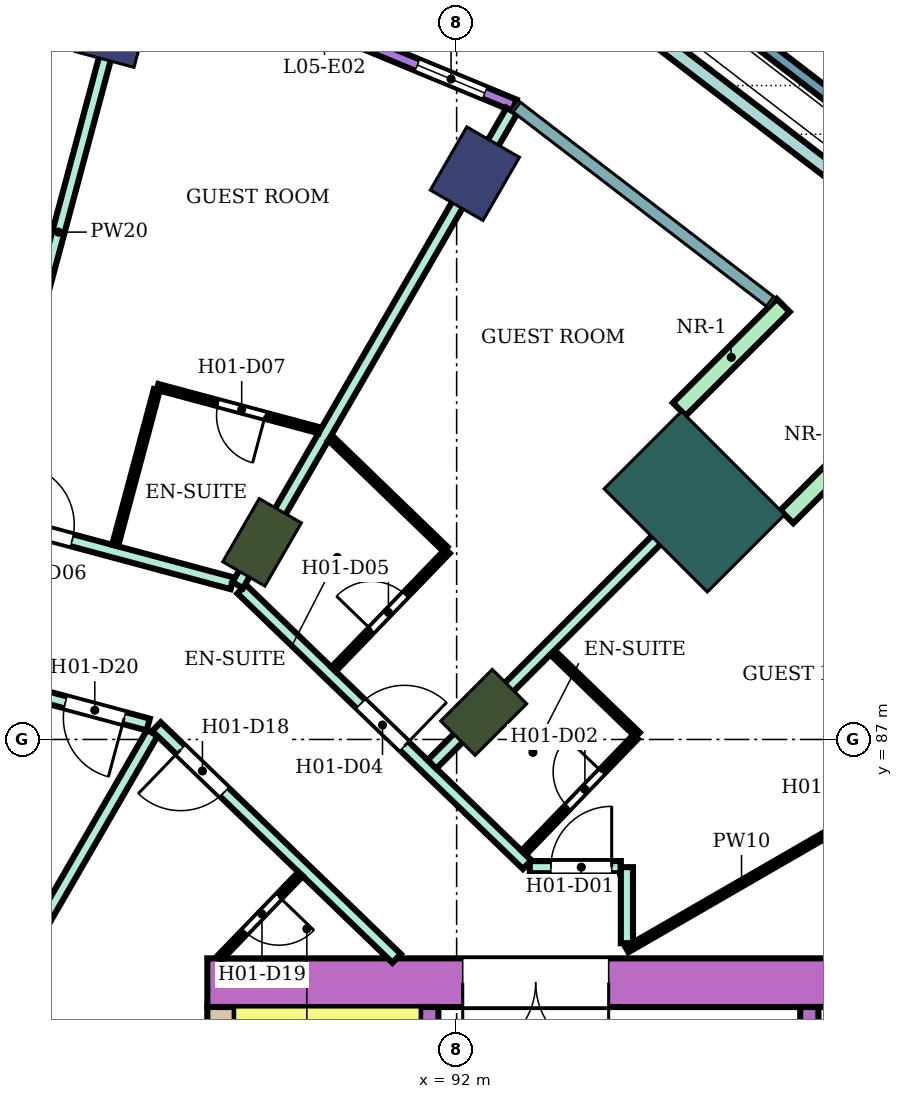
"""IFC4 building model, lengths in metres.
Left out: names, types, materials, properties, quantities, classifications, styles, units other than length and angle.
Written with IfcOpenShell. Run it as: python <this file> out.ifc"""

import sys

from ifc_helpers import new_model, si_unit, direction, frame, frame_2d, origin, origin_2d, place, context, subcontext, project, spatial, rectangle, extrude, element, fill, save


model = new_model("IFC4")
c1 = context("Model", 3, precision=1e-05, world=origin(), true_north=direction((0.0, 1.0)))
c2 = subcontext(c1, "Body", "Model", "MODEL_VIEW")
j1 = project(units=[si_unit("LENGTHUNIT", "METRE"), si_unit("PLANEANGLEUNIT", "RADIAN")], contexts=[c1])
p1 = place(None, origin())
s1 = spatial("IfcSite", under=j1, at=p1, CompositionType="ELEMENT")
p2 = place(p1, origin())
s2 = spatial("IfcBuilding", under=s1, at=p2, CompositionType="ELEMENT")
p3 = place(p2, frame((0.0, 0.0, 28.8)))
s3 = spatial("IfcBuildingStorey", under=s2, at=p3, CompositionType="ELEMENT", Elevation=28.8)
for number, where, z_axis, x_axis in (
    (1, (92.3, 96.304, 0.0), (0.0, 0.0, 1.0), (0.5, 0.866, 0.0)),
    (2, (86.367, 98.762, 0.0), (0.0, 0.0, 1.0), (0.259, 0.966, 0.0)),
):
    element("IfcColumn", number, at=place(p3, frame(where, z_axis=z_axis, x_axis=x_axis)), inside=s3, PredefinedType="COLUMN", context=c2, shape_type="SweptSolid", body=[
        extrude(rectangle(XDim=1.2, YDim=1.0, at=origin_2d()), origin(), (0.0, 0.0, 1.0), 3.8),
    ])
for number, where, z_axis, x_axis in (
    (3, (92.445, 87.445, 0.0), (0.0, 0.0, 1.0), (0.707, 0.707, 0.0)),
    (4, (88.8, 90.242, 0.0), (0.0, 0.0, 1.0), (0.5, 0.866, 0.0)),
):
    element("IfcColumn", number, at=place(p3, frame(where, z_axis=z_axis, x_axis=x_axis)), inside=s3, PredefinedType="COLUMN", context=c2, shape_type="SweptSolid", body=[
        extrude(rectangle(XDim=1.2, YDim=0.8, at=origin_2d()), origin(), (0.0, 0.0, 1.0), 3.8),
    ])
p4 = place(p3, frame((95.91, 90.91, 0.0), z_axis=(0.0, 0.0, 1.0), x_axis=(0.707106781187, 0.707106781187, 0.0)))
e5 = element("IfcColumn", 5, at=p4, inside=s3, PredefinedType="COLUMN", context=c2, shape_type="SweptSolid", body=[
    extrude(rectangle(XDim=1.8, YDim=2.4, at=origin_2d()), origin(), (0.0, 0.0, 1.0), 3.8),
])
p5 = place(p3, frame((87.9, 83.0, 0.0), z_axis=(0.0, 0.0, 1.0), x_axis=(1.0, 0.0, 0.0)))
e6 = element("IfcWall", 6, at=p5, inside=s3, PredefinedType="SHEAR", context=c2, shape_type="SweptSolid", body=[
    extrude(rectangle(XDim=14.7, YDim=0.8, at=frame_2d((7.35, 0.0))), origin(), (0.0, 0.0, 1.0), 3.48),
])
p6 = place(p5, frame((4.2, 0.0, 0.0)))
e7 = element("IfcOpeningElement", 7, at=p6, cuts=e6, PredefinedType="OPENING", context=c2, shape_type="SweptSolid", body=[
    extrude(rectangle(XDim=2.4, YDim=2.4, at=frame_2d((1.2, 1.2))), frame((0.0, 0.41, 0.0), z_axis=(0.0, -1.0, 0.0), x_axis=(1.0, 0.0, 0.0)), (0.0, 0.0, 1.0), 0.82),
])
p7 = place(p3, frame((88.125, 75.0, 0.0), z_axis=(0.0, 0.0, 1.0), x_axis=(0.0, 1.0, 0.0)))
e8 = element("IfcWall", 8, at=p7, inside=s3, PredefinedType="SHEAR", context=c2, shape_type="SweptSolid", body=[
    extrude(rectangle(XDim=7.6, YDim=0.45, at=frame_2d((3.8, 0.0))), origin(), (0.0, 0.0, 1.0), 3.48),
])
p8 = place(p3, frame((91.55, 75.0, 0.0), z_axis=(0.0, 0.0, 1.0), x_axis=(0.0, 1.0, 0.0)))
e9 = element("IfcWall", 9, at=p8, inside=s3, PredefinedType="SHEAR", context=c2, shape_type="SweptSolid", body=[
    extrude(rectangle(XDim=7.6, YDim=0.3, at=frame_2d((3.8, 0.0))), origin(), (0.0, 0.0, 1.0), 3.48),
])
p9 = place(p8, frame((1.85, 0.0, 0.0)))
e10 = element("IfcOpeningElement", 10, at=p9, cuts=e9, PredefinedType="OPENING", context=c2, shape_type="SweptSolid", body=[
    extrude(rectangle(XDim=0.9, YDim=2.1, at=frame_2d((0.45, 1.05))), frame((0.0, 0.16, 0.0), z_axis=(0.0, -1.0, 0.0), x_axis=(1.0, 0.0, 0.0)), (0.0, 0.0, 1.0), 0.32),
])
p10 = place(p3, frame((97.8, 78.6, 0.0), z_axis=(0.0, 0.0, 1.0), x_axis=(0.0, 1.0, 0.0)))
e11 = element("IfcWall", 11, at=p10, inside=s3, PredefinedType="SHEAR", context=c2, shape_type="SweptSolid", body=[
    extrude(rectangle(XDim=4.0, YDim=0.3, at=frame_2d((2.0, 0.0))), origin(), (0.0, 0.0, 1.0), 3.48),
])
p11 = place(p3, frame((92.949, 97.429, 0.0), z_axis=(0.0, 0.0, 1.0), x_axis=(-0.923875115043, 0.382694096902, 0.0)))
e12 = element("IfcWall", 12, at=p11, inside=s3, PredefinedType="NOTDEFINED", context=c2, shape_type="SweptSolid", body=[
    extrude(rectangle(XDim=6.761, YDim=0.2, at=frame_2d((3.38, 0.0))), origin(), (0.0, 0.0, 1.0), 3.8),
])
p12 = place(p11, frame((0.527, 0.0, 0.9)))
e13 = element("IfcOpeningElement", 13, at=p12, cuts=e12, PredefinedType="OPENING", context=c2, shape_type="SweptSolid", body=[
    extrude(rectangle(XDim=1.2, YDim=2.4, at=frame_2d((0.6, 1.2))), frame((0.0, 0.11, 0.0), z_axis=(0.0, -1.0, 0.0), x_axis=(1.0, 0.0, 0.0)), (0.0, 0.0, 1.0), 0.22),
])
p13 = place(p11, frame((2.48, 0.0, 0.0)))
e14 = element("IfcOpeningElement", 14, at=p13, cuts=e12, PredefinedType="OPENING", context=c2, shape_type="SweptSolid", body=[
    extrude(rectangle(XDim=1.8, YDim=2.4, at=frame_2d((0.9, 1.2))), frame((0.0, 0.11, 0.0), z_axis=(0.0, -1.0, 0.0), x_axis=(1.0, 0.0, 0.0)), (0.0, 0.0, 1.0), 0.22),
])
p14 = place(p11, frame((5.034, 0.0, 0.9)))
e15 = element("IfcOpeningElement", 15, at=p14, cuts=e12, PredefinedType="OPENING", context=c2, shape_type="SweptSolid", body=[
    extrude(rectangle(XDim=1.2, YDim=2.4, at=frame_2d((0.6, 1.2))), frame((0.0, 0.11, 0.0), z_axis=(0.0, -1.0, 0.0), x_axis=(1.0, 0.0, 0.0)), (0.0, 0.0, 1.0), 0.22),
])
for number, where, z_axis, x_axis in (
    (16, (97.43, 90.662, 0.0), (0.0, 0.0, 1.0), (0.707, 0.707, 0.0)),
    (17, (95.662, 92.43, 0.0), (0.0, 0.0, 1.0), (0.707, 0.707, 0.0)),
):
    element("IfcWall", number, at=place(p3, frame(where, z_axis=z_axis, x_axis=x_axis)), inside=s3, PredefinedType="NOTDEFINED", context=c2, shape_type="SweptSolid", body=[
        extrude(rectangle(XDim=2.416, YDim=0.3, at=frame_2d((1.208, 0.0))), origin(), (0.0, 0.0, 1.0), 3.8),
    ])
p15 = place(p3, frame((94.609, 100.278, 0.0), z_axis=(0.0, 0.0, 1.0), x_axis=(0.793367808682, -0.608742572971, 0.0)))
e18 = element("IfcWall", 18, at=p15, inside=s3, PredefinedType="PARAPET", context=c2, shape_type="SweptSolid", body=[
    extrude(rectangle(XDim=7.596, YDim=0.2, at=frame_2d((3.798, 0.0))), origin(), (0.0, 0.0, 1.0), 1.1),
])
p16 = place(p3, frame((94.123, 99.428, 0.0), z_axis=(0.0, 0.0, 1.0), x_axis=(0.793355967101, -0.608758005668, 0.0)))
e19 = element("IfcWall", 19, at=p16, inside=s3, PredefinedType="USERDEFINED", context=c2, shape_type="SweptSolid", body=[
    extrude(rectangle(XDim=6.232, YDim=0.25, at=frame_2d((3.116, 0.0))), origin(), (0.0, 0.0, 1.0), 0.6),
])
p17 = place(p3, frame((80.0, 89.104, 0.0), z_axis=(0.0, 0.0, 1.0), x_axis=(0.965856548257, -0.259077455964, 0.0)))
e20 = element("IfcWall", 20, at=p17, inside=s3, PredefinedType="PARTITIONING", context=c2, shape_type="SweptSolid", body=[
    extrude(rectangle(XDim=7.173, YDim=0.2, at=frame_2d((3.586, 0.0))), origin(), (0.0, 0.0, 1.0), 3.35),
])
p18 = place(p17, frame((5.763, 0.0, 0.0)))
e21 = element("IfcOpeningElement", 21, at=p18, cuts=e20, PredefinedType="OPENING", context=c2, shape_type="SweptSolid", body=[
    extrude(rectangle(XDim=1.0, YDim=2.1, at=frame_2d((0.5, 1.05))), frame((0.0, 0.11, 0.0), z_axis=(0.0, -1.0, 0.0), x_axis=(1.0, 0.0, 0.0)), (0.0, 0.0, 1.0), 0.22),
])
p19 = place(p3, frame((80.0, 91.797, 0.0), z_axis=(0.0, 0.0, 1.0), x_axis=(0.965857042792, -0.259075612301, 0.0)))
e22 = element("IfcWall", 22, at=p19, inside=s3, PredefinedType="PARTITIONING", context=c2, shape_type="SweptSolid", body=[
    extrude(rectangle(XDim=8.602, YDim=0.2, at=frame_2d((4.301, 0.0))), origin(), (0.0, 0.0, 1.0), 3.35),
])
p20 = place(p19, frame((4.877, 0.0, 0.0)))
e23 = element("IfcOpeningElement", 23, at=p20, cuts=e22, PredefinedType="OPENING", context=c2, shape_type="SweptSolid", body=[
    extrude(rectangle(XDim=1.0, YDim=2.1, at=frame_2d((0.5, 1.05))), frame((0.0, 0.11, 0.0), z_axis=(0.0, -1.0, 0.0), x_axis=(1.0, 0.0, 0.0)), (0.0, 0.0, 1.0), 0.22),
])
p21 = place(p19, frame((2.73, 0.0, 0.0)))
e24 = element("IfcOpeningElement", 24, at=p21, cuts=e22, PredefinedType="OPENING", context=c2, shape_type="SweptSolid", body=[
    extrude(rectangle(XDim=1.1, YDim=2.1, at=frame_2d((0.55, 1.05))), frame((0.0, 0.11, 0.0), z_axis=(0.0, -1.0, 0.0), x_axis=(1.0, 0.0, 0.0)), (0.0, 0.0, 1.0), 0.22),
])
p22 = place(p3, frame((83.852, 81.665, 0.0), z_axis=(0.0, 0.0, 1.0), x_axis=(0.500253653624, 0.865878907259, 0.0)))
e25 = element("IfcWall", 25, at=p22, inside=s3, PredefinedType="PARTITIONING", context=c2, shape_type="SweptSolid", body=[
    extrude(rectangle(XDim=6.285, YDim=0.2, at=frame_2d((3.143, 0.0))), origin(), (0.0, 0.0, 1.0), 3.35),
])
p23 = place(p3, frame((84.225, 90.768, 0.0), z_axis=(0.0, 0.0, 1.0), x_axis=(0.258817230439, 0.965926312525, 0.0)))
e26 = element("IfcWall", 26, at=p23, inside=s3, PredefinedType="PARTITIONING", context=c2, shape_type="SweptSolid", body=[
    extrude(rectangle(XDim=9.474, YDim=0.2, at=frame_2d((4.737, 0.0))), origin(), (0.0, 0.0, 1.0), 3.35),
])
p24 = place(p3, frame((87.064, 87.211, 0.0), z_axis=(0.0, 0.0, 1.0), x_axis=(0.719540958932, -0.694450004262, 0.0)))
e27 = element("IfcWall", 27, at=p24, inside=s3, PredefinedType="PARTITIONING", context=c2, shape_type="SweptSolid", body=[
    extrude(rectangle(XDim=5.488, YDim=0.2, at=frame_2d((2.744, 0.0))), origin(), (0.0, 0.0, 1.0), 3.35),
])
p25 = place(p24, frame((0.55, 0.0, 0.0)))
e28 = element("IfcOpeningElement", 28, at=p25, cuts=e27, PredefinedType="OPENING", context=c2, shape_type="SweptSolid", body=[
    extrude(rectangle(XDim=1.0, YDim=2.1, at=frame_2d((0.5, 1.05))), frame((0.0, 0.11, 0.0), z_axis=(0.0, -1.0, 0.0), x_axis=(1.0, 0.0, 0.0)), (0.0, 0.0, 1.0), 0.22),
])
p26 = place(p3, frame((88.465, 89.473, 0.0), z_axis=(0.0, 0.0, 1.0), x_axis=(0.719457552421, -0.694536413922, 0.0)))
e29 = element("IfcWall", 29, at=p26, inside=s3, PredefinedType="PARTITIONING", context=c2, shape_type="SweptSolid", body=[
    extrude(rectangle(XDim=6.524, YDim=0.2, at=frame_2d((3.262, 0.0))), origin(), (0.0, 0.0, 1.0), 3.35),
])
p27 = place(p26, frame((2.719, 0.0, 0.0)))
e30 = element("IfcOpeningElement", 30, at=p27, cuts=e29, PredefinedType="OPENING", context=c2, shape_type="SweptSolid", body=[
    extrude(rectangle(XDim=1.0, YDim=2.1, at=frame_2d((0.5, 1.05))), frame((0.0, 0.11, 0.0), z_axis=(0.0, -1.0, 0.0), x_axis=(1.0, 0.0, 0.0)), (0.0, 0.0, 1.0), 0.22),
])
p28 = place(p3, frame((88.4, 89.538, 0.0), z_axis=(0.0, 0.0, 1.0), x_axis=(0.5002401188, 0.865886726739, 0.0)))
e31 = element("IfcWall", 31, at=p28, inside=s3, PredefinedType="PARTITIONING", context=c2, shape_type="SweptSolid", body=[
    extrude(rectangle(XDim=9.008, YDim=0.2, at=frame_2d((4.504, 0.0))), origin(), (0.0, 0.0, 1.0), 3.35),
])
p29 = place(p3, frame((91.594, 86.591, 0.0), z_axis=(0.0, 0.0, 1.0), x_axis=(0.707214399597, 0.706999146394, 0.0)))
e32 = element("IfcWall", 32, at=p29, inside=s3, PredefinedType="PARTITIONING", context=c2, shape_type="SweptSolid", body=[
    extrude(rectangle(XDim=6.805, YDim=0.2, at=frame_2d((3.403, 0.0))), origin(), (0.0, 0.0, 1.0), 3.35),
])
p30 = place(p3, frame((93.203, 84.9, 0.0), z_axis=(0.0, 0.0, 1.0), x_axis=(1.0, 0.0, 0.0)))
e33 = element("IfcWall", 33, at=p30, inside=s3, PredefinedType="PARTITIONING", context=c2, shape_type="SweptSolid", body=[
    extrude(rectangle(XDim=1.497, YDim=0.2, at=frame_2d((0.749, 0.0))), origin(), (0.0, 0.0, 1.0), 3.35),
])
p31 = place(p30, frame((0.347, 0.0, 0.0)))
e34 = element("IfcOpeningElement", 34, at=p31, cuts=e33, PredefinedType="OPENING", context=c2, shape_type="SweptSolid", body=[
    extrude(rectangle(XDim=1.0, YDim=2.1, at=frame_2d((0.5, 1.05))), frame((0.0, 0.11, 0.0), z_axis=(0.0, -1.0, 0.0), x_axis=(1.0, 0.0, 0.0)), (0.0, 0.0, 1.0), 0.22),
])
p32 = place(p3, frame((94.8, 83.65, 0.0), z_axis=(0.0, 0.0, 1.0), x_axis=(0.0, 1.0, 0.0)))
e35 = element("IfcWall", 35, at=p32, inside=s3, PredefinedType="PARTITIONING", context=c2, shape_type="SweptSolid", body=[
    extrude(rectangle(XDim=1.25, YDim=0.2, at=frame_2d((0.625, 0.0))), origin(), (0.0, 0.0, 1.0), 3.35),
])
p33 = place(p3, frame((86.384, 90.19, 0.0), z_axis=(0.0, 0.0, 1.0), x_axis=(0.258677737588, 0.965963678446, 0.0)))
e36 = element("IfcWall", 36, at=p33, inside=s3, PredefinedType="PARTITIONING", context=c2, shape_type="SweptSolid", body=[
    extrude(rectangle(XDim=2.649, YDim=0.1, at=frame_2d((1.325, 0.0))), origin(), (0.0, 0.0, 1.0), 3.35),
])
p34 = place(p3, frame((87.082, 92.797, 0.0), z_axis=(0.0, 0.0, 1.0), x_axis=(0.965926679745, -0.258815859939, 0.0)))
e37 = element("IfcWall", 37, at=p34, inside=s3, PredefinedType="PARTITIONING", context=c2, shape_type="SweptSolid", body=[
    extrude(rectangle(XDim=2.753, YDim=0.1, at=frame_2d((1.377, 0.0))), origin(), (0.0, 0.0, 1.0), 3.35),
])
p35 = place(p34, frame((1.032, 0.0, 0.0)))
e38 = element("IfcOpeningElement", 38, at=p35, cuts=e37, PredefinedType="OPENING", context=c2, shape_type="SweptSolid", body=[
    extrude(rectangle(XDim=0.8, YDim=2.1, at=frame_2d((0.4, 1.05))), frame((0.0, 0.06, 0.0), z_axis=(0.0, -1.0, 0.0), x_axis=(1.0, 0.0, 0.0)), (0.0, 0.0, 1.0), 0.12),
])
p36 = place(p3, frame((88.095, 83.4, 0.0), z_axis=(0.0, 0.0, 1.0), x_axis=(0.694447472534, 0.719543402368, 0.0)))
e39 = element("IfcWall", 39, at=p36, inside=s3, PredefinedType="PARTITIONING", context=c2, shape_type="SweptSolid", body=[
    extrude(rectangle(XDim=1.926, YDim=0.1, at=frame_2d((0.963, 0.0))), origin(), (0.0, 0.0, 1.0), 3.35),
])
p37 = place(p36, frame((0.613, 0.0, 0.0)))
e40 = element("IfcOpeningElement", 40, at=p37, cuts=e39, PredefinedType="OPENING", context=c2, shape_type="SweptSolid", body=[
    extrude(rectangle(XDim=0.8, YDim=2.1, at=frame_2d((0.4, 1.05))), frame((0.0, 0.06, 0.0), z_axis=(0.0, -1.0, 0.0), x_axis=(1.0, 0.0, 0.0)), (0.0, 0.0, 1.0), 0.12),
])
p38 = place(p3, frame((89.925, 91.956, 0.0), z_axis=(0.0, 0.0, 1.0), x_axis=(0.71935982196, -0.694637636865, 0.0)))
e41 = element("IfcWall", 41, at=p38, inside=s3, PredefinedType="PARTITIONING", context=c2, shape_type="SweptSolid", body=[
    extrude(rectangle(XDim=2.627, YDim=0.1, at=frame_2d((1.313, 0.0))), origin(), (0.0, 0.0, 1.0), 3.35),
])
p39 = place(p3, frame((89.976, 88.154, 0.0), z_axis=(0.0, 0.0, 1.0), x_axis=(0.6945137956, 0.719479386585, 0.0)))
e42 = element("IfcWall", 42, at=p39, inside=s3, PredefinedType="PARTITIONING", context=c2, shape_type="SweptSolid", body=[
    extrude(rectangle(XDim=2.699, YDim=0.1, at=frame_2d((1.35, 0.0))), origin(), (0.0, 0.0, 1.0), 3.35),
])
p40 = place(p39, frame((0.9, 0.0, 0.0)))
e43 = element("IfcOpeningElement", 43, at=p40, cuts=e42, PredefinedType="OPENING", context=c2, shape_type="SweptSolid", body=[
    extrude(rectangle(XDim=0.8, YDim=2.1, at=frame_2d((0.4, 1.05))), frame((0.0, 0.06, 0.0), z_axis=(0.0, -1.0, 0.0), x_axis=(1.0, 0.0, 0.0)), (0.0, 0.0, 1.0), 0.12),
])
p41 = place(p3, frame((93.103, 85.136, 0.0), z_axis=(0.0, 0.0, 1.0), x_axis=(0.694324808789, 0.719661767708, 0.0)))
e44 = element("IfcWall", 44, at=p41, inside=s3, PredefinedType="PARTITIONING", context=c2, shape_type="SweptSolid", body=[
    extrude(rectangle(XDim=2.65, YDim=0.1, at=frame_2d((1.325, 0.0))), origin(), (0.0, 0.0, 1.0), 3.35),
])
p42 = place(p41, frame((1.05, 0.0, 0.0)))
e45 = element("IfcOpeningElement", 45, at=p42, cuts=e44, PredefinedType="OPENING", context=c2, shape_type="SweptSolid", body=[
    extrude(rectangle(XDim=0.8, YDim=2.1, at=frame_2d((0.4, 1.05))), frame((0.0, 0.06, 0.0), z_axis=(0.0, -1.0, 0.0), x_axis=(1.0, 0.0, 0.0)), (0.0, 0.0, 1.0), 0.12),
])
p43 = place(p3, frame((93.581, 88.425, 0.0), z_axis=(0.0, 0.0, 1.0), x_axis=(0.719336381931, -0.694661910307, 0.0)))
e46 = element("IfcWall", 46, at=p43, inside=s3, PredefinedType="PARTITIONING", context=c2, shape_type="SweptSolid", body=[
    extrude(rectangle(XDim=1.939, YDim=0.1, at=frame_2d((0.97, 0.0))), origin(), (0.0, 0.0, 1.0), 3.35),
])
p44 = place(p3, frame((94.8, 83.545, 0.0), z_axis=(0.0, 0.0, 1.0), x_axis=(0.86602264145, 0.500004784474, 0.0)))
e47 = element("IfcWall", 47, at=p44, inside=s3, PredefinedType="PARTITIONING", context=c2, shape_type="SweptSolid", body=[
    extrude(rectangle(XDim=8.708, YDim=0.1, at=frame_2d((4.354, 0.0))), origin(), (0.0, 0.0, 1.0), 3.35),
])
p45 = place(p44, frame((3.879, 0.0, 0.0)))
e48 = element("IfcOpeningElement", 48, at=p45, cuts=e47, PredefinedType="OPENING", context=c2, shape_type="SweptSolid", body=[
    extrude(rectangle(XDim=0.9, YDim=2.1, at=frame_2d((0.45, 1.05))), frame((0.0, 0.06, 0.0), z_axis=(0.0, -1.0, 0.0), x_axis=(1.0, 0.0, 0.0)), (0.0, 0.0, 1.0), 0.12),
])
p46 = place(p12, origin())
e49 = element("IfcWindow", 49, at=p46, inside=s3, PartitioningType="SINGLE_PANEL", PredefinedType="WINDOW", context=c2, shape_type="SweptSolid", body=[
    extrude(rectangle(XDim=1.2, YDim=2.4, at=frame_2d((0.6, 1.2))), frame((0.0, 0.03, 0.0), z_axis=(0.0, -1.0, 0.0), x_axis=(1.0, 0.0, 0.0)), (0.0, 0.0, 1.0), 0.06),
])
fill(e13, e49)
p47 = place(p31, origin())
e50 = element("IfcDoor", 50, at=p47, inside=s3, OperationType="SINGLE_SWING_RIGHT", PredefinedType="DOOR", context=c2, shape_type="SweptSolid", body=[
    extrude(rectangle(XDim=1.0, YDim=2.1, at=frame_2d((0.5, 1.05))), frame((0.0, 0.025, 0.0), z_axis=(0.0, -1.0, 0.0), x_axis=(1.0, 0.0, 0.0)), (0.0, 0.0, 1.0), 0.05),
])
fill(e34, e50)
p48 = place(p42, origin())
e51 = element("IfcDoor", 51, at=p48, inside=s3, OperationType="SINGLE_SWING_RIGHT", PredefinedType="DOOR", context=c2, shape_type="SweptSolid", body=[
    extrude(rectangle(XDim=0.8, YDim=2.1, at=frame_2d((0.4, 1.05))), frame((0.0, 0.025, 0.0), z_axis=(0.0, -1.0, 0.0), x_axis=(1.0, 0.0, 0.0)), (0.0, 0.0, 1.0), 0.05),
])
fill(e45, e51)
p49 = place(p27, origin())
e52 = element("IfcDoor", 52, at=p49, inside=s3, OperationType="SINGLE_SWING_RIGHT", PredefinedType="DOOR", context=c2, shape_type="SweptSolid", body=[
    extrude(rectangle(XDim=1.0, YDim=2.1, at=frame_2d((0.5, 1.05))), frame((0.0, 0.025, 0.0), z_axis=(0.0, -1.0, 0.0), x_axis=(1.0, 0.0, 0.0)), (0.0, 0.0, 1.0), 0.05),
])
fill(e30, e52)
p50 = place(p40, origin())
e53 = element("IfcDoor", 53, at=p50, inside=s3, OperationType="SINGLE_SWING_LEFT", PredefinedType="DOOR", context=c2, shape_type="SweptSolid", body=[
    extrude(rectangle(XDim=0.8, YDim=2.1, at=frame_2d((0.4, 1.05))), frame((0.0, 0.025, 0.0), z_axis=(0.0, -1.0, 0.0), x_axis=(1.0, 0.0, 0.0)), (0.0, 0.0, 1.0), 0.05),
])
fill(e43, e53)
p51 = place(p20, origin())
e54 = element("IfcDoor", 54, at=p51, inside=s3, OperationType="SINGLE_SWING_LEFT", PredefinedType="DOOR", context=c2, shape_type="SweptSolid", body=[
    extrude(rectangle(XDim=1.0, YDim=2.1, at=frame_2d((0.5, 1.05))), frame((0.0, 0.025, 0.0), z_axis=(0.0, -1.0, 0.0), x_axis=(1.0, 0.0, 0.0)), (0.0, 0.0, 1.0), 0.05),
])
fill(e23, e54)
p52 = place(p35, frame((0.8, 0.0, 0.0), z_axis=(0.0, 0.0, 1.0), x_axis=(-1.0, 0.0, 0.0)))
e55 = element("IfcDoor", 55, at=p52, inside=s3, OperationType="SINGLE_SWING_LEFT", PredefinedType="DOOR", context=c2, shape_type="SweptSolid", body=[
    extrude(rectangle(XDim=0.8, YDim=2.1, at=frame_2d((0.4, 1.05))), frame((0.0, 0.025, 0.0), z_axis=(0.0, -1.0, 0.0), x_axis=(1.0, 0.0, 0.0)), (0.0, 0.0, 1.0), 0.05),
])
fill(e38, e55)
p53 = place(p25, frame((1.0, 0.0, 0.0), z_axis=(0.0, 0.0, 1.0), x_axis=(-1.0, 0.0, 0.0)))
e56 = element("IfcDoor", 56, at=p53, inside=s3, OperationType="SINGLE_SWING_RIGHT", PredefinedType="DOOR", context=c2, shape_type="SweptSolid", body=[
    extrude(rectangle(XDim=1.0, YDim=2.1, at=frame_2d((0.5, 1.05))), frame((0.0, 0.025, 0.0), z_axis=(0.0, -1.0, 0.0), x_axis=(1.0, 0.0, 0.0)), (0.0, 0.0, 1.0), 0.05),
])
fill(e28, e56)
p54 = place(p37, frame((0.8, 0.0, 0.0), z_axis=(0.0, 0.0, 1.0), x_axis=(-1.0, 0.0, 0.0)))
e57 = element("IfcDoor", 57, at=p54, inside=s3, OperationType="SINGLE_SWING_LEFT", PredefinedType="DOOR", context=c2, shape_type="SweptSolid", body=[
    extrude(rectangle(XDim=0.8, YDim=2.1, at=frame_2d((0.4, 1.05))), frame((0.0, 0.025, 0.0), z_axis=(0.0, -1.0, 0.0), x_axis=(1.0, 0.0, 0.0)), (0.0, 0.0, 1.0), 0.05),
])
fill(e40, e57)
p55 = place(p18, frame((1.0, 0.0, 0.0), z_axis=(0.0, 0.0, 1.0), x_axis=(-1.0, 0.0, 0.0)))
e58 = element("IfcDoor", 58, at=p55, inside=s3, OperationType="SINGLE_SWING_LEFT", PredefinedType="DOOR", context=c2, shape_type="SweptSolid", body=[
    extrude(rectangle(XDim=1.0, YDim=2.1, at=frame_2d((0.5, 1.05))), frame((0.0, 0.025, 0.0), z_axis=(0.0, -1.0, 0.0), x_axis=(1.0, 0.0, 0.0)), (0.0, 0.0, 1.0), 0.05),
])
fill(e21, e58)
p56 = place(p6, frame((2.4, 0.0, 0.0), z_axis=(0.0, 0.0, 1.0), x_axis=(-1.0, 0.0, 0.0)))
e59 = element("IfcDoor", 59, at=p56, inside=s3, OperationType="DOUBLE_DOOR_SINGLE_SWING", PredefinedType="DOOR", context=c2, shape_type="SweptSolid", body=[
    extrude(rectangle(XDim=2.4, YDim=2.4, at=frame_2d((1.2, 1.2))), frame((0.0, 0.025, 0.0), z_axis=(0.0, -1.0, 0.0), x_axis=(1.0, 0.0, 0.0)), (0.0, 0.0, 1.0), 0.05),
])
fill(e7, e59)
save(model, sys.argv[1])
